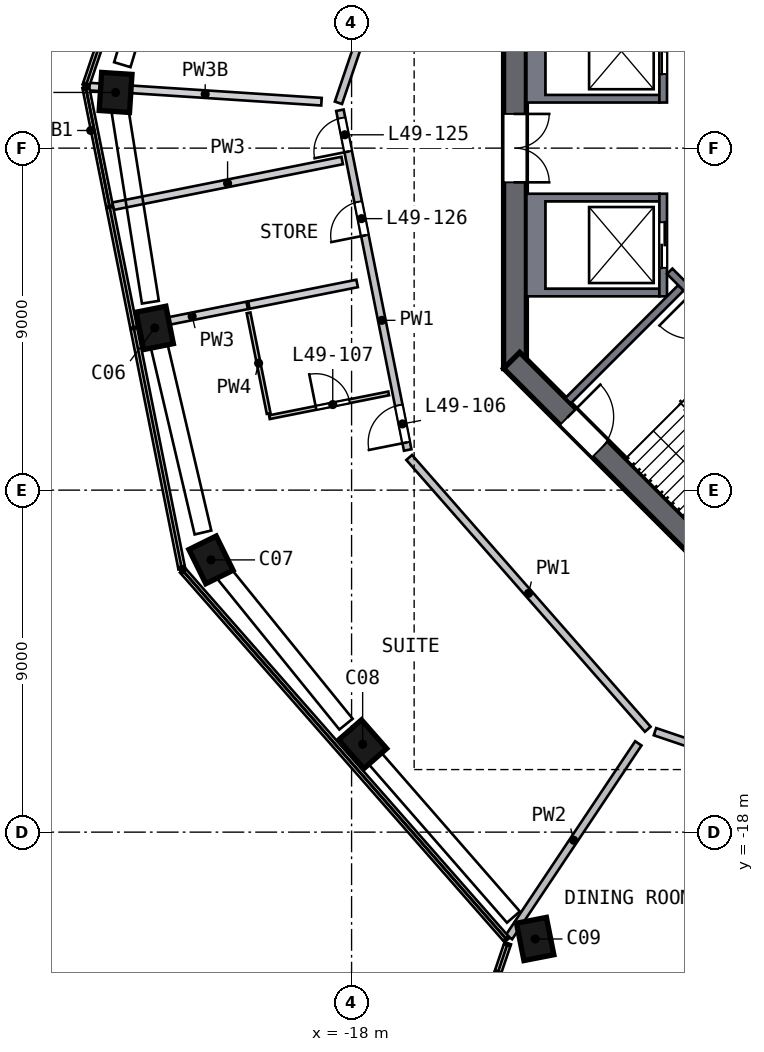
"""IFC4 building model, lengths in metres.
Left out: names, types, materials, properties, quantities, classifications, styles, units other than length and angle.
Written with IfcOpenShell. Run it as: python <this file> out.ifc"""

import sys

from ifc_helpers import new_model, si_unit, direction, frame, frame_2d, origin, origin_2d, place, context, subcontext, project, spatial, polyline, rectangle, outline, extrude, element, fill, save


model = new_model("IFC4")
c1 = context("Model", 3, precision=1e-05, world=origin(), true_north=direction((0.0, 1.0)))
c2 = subcontext(c1, "Body", "Model", "MODEL_VIEW")
j1 = project(units=[si_unit("LENGTHUNIT", "METRE"), si_unit("PLANEANGLEUNIT", "RADIAN")], contexts=[c1])
p1 = place(None, origin())
s1 = spatial("IfcSite", under=j1, at=p1, CompositionType="ELEMENT")
p2 = place(p1, origin())
s2 = spatial("IfcBuilding", under=s1, at=p2, CompositionType="ELEMENT")
p3 = place(p2, frame((0.0, 0.0, 201.0)))
s3 = spatial("IfcBuildingStorey", under=s2, at=p3, CompositionType="ELEMENT", Elevation=201.0)
p4 = place(p3, frame((-24.204, 1.574, 0.0), z_axis=(-0.005106808, -0.089833403, 0.995943713), x_axis=(0.064922521, 0.993825699, 0.089975257)))
e1 = element("IfcColumn", 1, at=p4, inside=s3, PredefinedType="COLUMN", context=c2, shape_type="SweptSolid", body=[
    extrude(rectangle(XDim=1.0, YDim=0.8, at=origin_2d()), origin(), (0.0, 0.0, 1.0), 4.207),
])
p5 = place(p3, frame((-23.201, -4.628, 0.0), z_axis=(0.017877406, -0.085904417, 0.996142976), x_axis=(0.194715676, -0.976927418, -0.087741814)))
e2 = element("IfcColumn", 2, at=p5, inside=s3, PredefinedType="COLUMN", context=c2, shape_type="SweptSolid", body=[
    extrude(rectangle(XDim=1.0, YDim=0.8, at=origin_2d()), origin(), (0.0, 0.0, 1.0), 4.206),
])
p6 = place(p3, frame((-21.748, -10.739, 0.0), z_axis=(0.040506371, -0.080316357, 0.995946041), x_axis=(-0.44095499, 0.893010518, 0.08994949)))
e3 = element("IfcColumn", 3, at=p6, inside=s3, PredefinedType="COLUMN", context=c2, shape_type="SweptSolid", body=[
    extrude(rectangle(XDim=1.0, YDim=0.8, at=origin_2d()), origin(), (0.0, 0.0, 1.0), 4.207),
])
p7 = place(p3, frame((-17.779, -15.608, 0.0), z_axis=(0.058449937, -0.065415172, 0.996144799), x_axis=(0.65742794, -0.748393953, -0.087721123)))
e4 = element("IfcColumn", 4, at=p7, inside=s3, PredefinedType="COLUMN", context=c2, shape_type="SweptSolid", body=[
    extrude(rectangle(XDim=1.0, YDim=0.8, at=origin_2d()), origin(), (0.0, 0.0, 1.0), 4.206),
])
p8 = place(p3, frame((-13.262, -20.753, 0.0), z_axis=(0.077347199, -0.048508821, 0.995823431), x_axis=(-0.191233181, 0.979548334, 0.062569411)))
e5 = element("IfcColumn", 5, at=p8, inside=s3, PredefinedType="COLUMN", context=c2, shape_type="SweptSolid", body=[
    extrude(rectangle(XDim=1.0, YDim=0.8, at=origin_2d()), origin(), (0.0, 0.0, 1.0), 4.208),
])
p9 = place(p3, frame((-13.7, 5.799, 0.0), z_axis=(0.0, 0.0, 1.0), x_axis=(0.0, -1.0, 0.0)))
e6 = element("IfcWall", 6, at=p9, inside=s3, PredefinedType="SHEAR", context=c2, shape_type="SweptSolid", body=[
    extrude(rectangle(XDim=11.598, YDim=0.6, at=frame_2d((5.799, 0.0))), origin(), (0.0, 0.0, 1.0), 4.5),
])
p10 = place(p9, frame((4.899, 0.0, 0.0)))
e7 = element("IfcOpeningElement", 7, at=p10, cuts=e6, PredefinedType="OPENING", context=c2, shape_type="SweptSolid", body=[
    extrude(rectangle(XDim=1.8, YDim=2.1, at=frame_2d((0.9, 1.05))), frame((0.0, 0.31, 0.0), z_axis=(0.0, -1.0, 0.0), x_axis=(1.0, 0.0, 0.0)), (0.0, 0.0, 1.0), 0.62),
])
p11 = place(p3, frame((-13.788, -5.587, 0.0), z_axis=(0.0, 0.0, 1.0), x_axis=(0.707106781, -0.707106781, 0.0)))
e8 = element("IfcWall", 8, at=p11, inside=s3, PredefinedType="SHEAR", context=c2, shape_type="SweptSolid", body=[
    extrude(rectangle(XDim=11.598, YDim=0.6, at=frame_2d((5.799, 0.0))), origin(), (0.0, 0.0, 1.0), 4.5),
])
p12 = place(p11, frame((2.099, 0.0, 0.0)))
e9 = element("IfcOpeningElement", 9, at=p12, cuts=e8, PredefinedType="OPENING", context=c2, shape_type="SweptSolid", body=[
    extrude(rectangle(XDim=1.2, YDim=2.1, at=frame_2d((0.6, 1.05))), frame((0.0, 0.31, 0.0), z_axis=(0.0, -1.0, 0.0), x_axis=(1.0, 0.0, 0.0)), (0.0, 0.0, 1.0), 0.62),
])
p13 = place(p3, origin())
e10 = element("IfcWall", 10, at=p13, inside=s3, PredefinedType="SOLIDWALL", context=c2, shape_type="SweptSolid", body=[
    extrude(outline(polyline([(-13.4, 3.9), (-9.9, 3.9), (-9.9, 3.7), (-12.9, 3.7), (-12.9, 1.4), (-9.9, 1.4), (-9.9, 1.2), (-13.4, 1.2), (-13.4, 3.9)])), origin(), (0.0, 0.0, 1.0), 4.19),
])
p14 = place(p3, frame((-9.8, 1.2, 0.0), z_axis=(0.0, 0.0, 1.0), x_axis=(0.0, 1.0, 0.0)))
e11 = element("IfcWall", 11, at=p14, inside=s3, PredefinedType="SOLIDWALL", context=c2, shape_type="SweptSolid", body=[
    extrude(rectangle(XDim=2.7, YDim=0.2, at=frame_2d((1.35, 0.0))), origin(), (0.0, 0.0, 1.0), 4.19),
])
p15 = place(p14, frame((0.75, 0.0, 0.0)))
e12 = element("IfcOpeningElement", 12, at=p15, cuts=e11, PredefinedType="OPENING", context=c2, shape_type="SweptSolid", body=[
    extrude(rectangle(XDim=1.2, YDim=2.1, at=frame_2d((0.6, 1.05))), frame((0.0, 0.11, 0.0), z_axis=(0.0, -1.0, 0.0), x_axis=(1.0, 0.0, 0.0)), (0.0, 0.0, 1.0), 0.22),
])
p16 = place(p3, origin())
e13 = element("IfcWall", 13, at=p16, inside=s3, PredefinedType="SOLIDWALL", context=c2, shape_type="SweptSolid", body=[
    extrude(outline(polyline([(-13.4, -3.9), (-13.4, -1.2), (-9.9, -1.2), (-9.9, -1.4), (-12.9, -1.4), (-12.9, -3.7), (-9.9, -3.7), (-9.9, -3.9), (-13.4, -3.9)])), origin(), (0.0, 0.0, 1.0), 4.19),
])
p17 = place(p3, frame((-9.8, -1.2, 0.0), z_axis=(0.0, 0.0, 1.0), x_axis=(0.0, -1.0, 0.0)))
e14 = element("IfcWall", 14, at=p17, inside=s3, PredefinedType="SOLIDWALL", context=c2, shape_type="SweptSolid", body=[
    extrude(rectangle(XDim=2.7, YDim=0.2, at=frame_2d((1.35, 0.0))), origin(), (0.0, 0.0, 1.0), 4.19),
])
p18 = place(p17, frame((0.75, 0.0, 0.0)))
e15 = element("IfcOpeningElement", 15, at=p18, cuts=e14, PredefinedType="OPENING", context=c2, shape_type="SweptSolid", body=[
    extrude(rectangle(XDim=1.2, YDim=2.1, at=frame_2d((0.6, 1.05))), frame((0.0, 0.11, 0.0), z_axis=(0.0, -1.0, 0.0), x_axis=(1.0, 0.0, 0.0)), (0.0, 0.0, 1.0), 0.22),
])
p19 = place(p3, frame((-3.535, -9.334, 0.0), z_axis=(0.0, 0.0, 1.0), x_axis=(-0.707120946, 0.707092617, 0.0)))
e16 = element("IfcWall", 16, at=p19, inside=s3, PredefinedType="SOLIDWALL", context=c2, shape_type="SweptSolid", body=[
    extrude(rectangle(XDim=8.618, YDim=0.2, at=frame_2d((4.309, 0.0))), origin(), (0.0, 0.0, 1.0), 4.19),
])
p20 = place(p19, frame((6.6, 0.0, 0.0)))
e17 = element("IfcOpeningElement", 17, at=p20, cuts=e16, PredefinedType="OPENING", context=c2, shape_type="SweptSolid", body=[
    extrude(rectangle(XDim=1.2, YDim=2.1, at=frame_2d((0.6, 1.05))), frame((0.0, 0.11, 0.0), z_axis=(0.0, -1.0, 0.0), x_axis=(1.0, 0.0, 0.0)), (0.0, 0.0, 1.0), 0.22),
])
p21 = place(p3, frame((-9.334, -3.677, 0.0), z_axis=(0.0, 0.0, 1.0), x_axis=(-0.707135845, -0.707077716, 0.0)))
e18 = element("IfcWall", 18, at=p21, inside=s3, PredefinedType="SOLIDWALL", context=c2, shape_type="SweptSolid", body=[
    extrude(rectangle(XDim=4.2, YDim=0.2, at=frame_2d((2.1, 0.0))), origin(), (0.0, 0.0, 1.0), 4.19),
])
p22 = place(p3, frame((-16.524, -7.943, 0.0), z_axis=(0.0, 0.0, 1.0), x_axis=(-0.195611383, 0.980681491, 0.0)))
e19 = element("IfcWall", 19, at=p22, inside=s3, PredefinedType="SOLIDWALL", context=c2, shape_type="SweptSolid", body=[
    extrude(rectangle(XDim=9.116, YDim=0.2, at=frame_2d((4.558, 0.0))), origin(), (0.0, 0.0, 1.0), 4.19),
])
p23 = place(p22, frame((0.2, 0.0, 0.0)))
e20 = element("IfcOpeningElement", 20, at=p23, cuts=e19, PredefinedType="OPENING", context=c2, shape_type="SweptSolid", body=[
    extrude(rectangle(XDim=1.0, YDim=2.1, at=frame_2d((0.5, 1.05))), frame((0.0, 0.11, 0.0), z_axis=(0.0, -1.0, 0.0), x_axis=(1.0, 0.0, 0.0)), (0.0, 0.0, 1.0), 0.22),
])
p24 = place(p22, frame((8.008, 0.0, 0.0)))
e21 = element("IfcOpeningElement", 21, at=p24, cuts=e19, PredefinedType="OPENING", context=c2, shape_type="SweptSolid", body=[
    extrude(rectangle(XDim=0.9, YDim=2.1, at=frame_2d((0.45, 1.05))), frame((0.0, 0.11, 0.0), z_axis=(0.0, -1.0, 0.0), x_axis=(1.0, 0.0, 0.0)), (0.0, 0.0, 1.0), 0.22),
])
p25 = place(p22, frame((5.758, 0.0, 0.0)))
e22 = element("IfcOpeningElement", 22, at=p25, cuts=e19, PredefinedType="OPENING", context=c2, shape_type="SweptSolid", body=[
    extrude(rectangle(XDim=0.9, YDim=2.1, at=frame_2d((0.45, 1.05))), frame((0.0, 0.11, 0.0), z_axis=(0.0, -1.0, 0.0), x_axis=(1.0, 0.0, 0.0)), (0.0, 0.0, 1.0), 0.22),
])
p26 = place(p3, frame((-18.346, 1.193, 0.0), z_axis=(0.0, 0.0, 1.0), x_axis=(0.320932913, 0.94710193, 0.0)))
e23 = element("IfcWall", 23, at=p26, inside=s3, PredefinedType="SOLIDWALL", context=c2, shape_type="SweptSolid", body=[
    extrude(rectangle(XDim=9.317, YDim=0.2, at=frame_2d((4.658, 0.0))), origin(), (0.0, 0.0, 1.0), 4.19),
])
p27 = place(p26, frame((5.15, 0.0, 0.0)))
e24 = element("IfcOpeningElement", 24, at=p27, cuts=e23, PredefinedType="OPENING", context=c2, shape_type="SweptSolid", body=[
    extrude(rectangle(XDim=1.0, YDim=2.1, at=frame_2d((0.5, 1.05))), frame((0.0, 0.11, 0.0), z_axis=(0.0, -1.0, 0.0), x_axis=(1.0, 0.0, 0.0)), (0.0, 0.0, 1.0), 0.22),
])
p28 = place(p3, frame((-16.484, -8.14, 0.0), z_axis=(0.0, 0.0, 1.0), x_axis=(0.659731564, -0.75150134, 0.0)))
e25 = element("IfcWall", 25, at=p28, inside=s3, PredefinedType="SOLIDWALL", context=c2, shape_type="SweptSolid", body=[
    extrude(rectangle(XDim=9.516, YDim=0.2, at=frame_2d((4.758, 0.0))), origin(), (0.0, 0.0, 1.0), 4.19),
])
p29 = place(p3, frame((-1.382, -18.282, 0.0), z_axis=(0.0, 0.0, 1.0), x_axis=(-0.947096925, 0.320947681, 0.0)))
e26 = element("IfcWall", 26, at=p29, inside=s3, PredefinedType="SOLIDWALL", context=c2, shape_type="SweptSolid", body=[
    extrude(rectangle(XDim=9.117, YDim=0.2, at=frame_2d((4.559, 0.0))), origin(), (0.0, 0.0, 1.0), 4.19),
])
p30 = place(p29, frame((3.665, 0.0, 0.0)))
e27 = element("IfcOpeningElement", 27, at=p30, cuts=e26, PredefinedType="OPENING", context=c2, shape_type="SweptSolid", body=[
    extrude(rectangle(XDim=1.8, YDim=2.1, at=frame_2d((0.9, 1.05))), frame((0.0, 0.11, 0.0), z_axis=(0.0, -1.0, 0.0), x_axis=(1.0, 0.0, 0.0)), (0.0, 0.0, 1.0), 0.22),
])
p31 = place(p3, frame((-13.858, -20.764, 0.0), z_axis=(0.0, 0.0, 1.0), x_axis=(0.555131954, 0.831762294, 0.0)))
e28 = element("IfcWall", 28, at=p31, inside=s3, PredefinedType="SOLIDWALL", context=c2, shape_type="SweptSolid", body=[
    extrude(rectangle(XDim=6.132, YDim=0.2, at=frame_2d((3.066, 0.0))), origin(), (0.0, 0.0, 1.0), 4.19),
])
p32 = place(p3, frame((-10.797, -26.653, 0.0), z_axis=(0.0, 0.0, 1.0), x_axis=(0.320945371, 0.947097708, 0.0)))
e29 = element("IfcWall", 29, at=p32, inside=s3, PredefinedType="SOLIDWALL", context=c2, shape_type="SweptSolid", body=[
    extrude(rectangle(XDim=10.75, YDim=0.2, at=frame_2d((5.375, 0.0))), origin(), (0.0, 0.0, 1.0), 3.69),
])
p33 = place(p32, frame((1.95, 0.0, 0.0)))
e30 = element("IfcOpeningElement", 30, at=p33, cuts=e29, PredefinedType="OPENING", context=c2, shape_type="SweptSolid", body=[
    extrude(rectangle(XDim=1.0, YDim=2.1, at=frame_2d((0.5, 1.05))), frame((0.0, 0.11, 0.0), z_axis=(0.0, -1.0, 0.0), x_axis=(1.0, 0.0, 0.0)), (0.0, 0.0, 1.0), 0.22),
])
p34 = place(p3, frame((-20.182, -6.983, 0.0), z_axis=(0.0, 0.0, 1.0), x_axis=(-0.195577067, 0.980688335, 0.0)))
e31 = element("IfcWall", 31, at=p34, inside=s3, PredefinedType="PARTITIONING", context=c2, shape_type="SweptSolid", body=[
    extrude(rectangle(XDim=2.7, YDim=0.1, at=frame_2d((1.35, 0.0))), origin(), (0.0, 0.0, 1.0), 4.19),
])
p35 = place(p3, frame((-20.163, -7.081, 0.0), z_axis=(0.0, 0.0, 1.0), x_axis=(0.980680318, 0.195617266, 0.0)))
e32 = element("IfcWall", 32, at=p35, inside=s3, PredefinedType="PARTITIONING", context=c2, shape_type="SweptSolid", body=[
    extrude(rectangle(XDim=3.2, YDim=0.1, at=frame_2d((1.6, 0.0))), origin(), (0.0, 0.0, 1.0), 4.19),
])
p36 = place(p35, frame((1.25, 0.0, 0.0)))
e33 = element("IfcOpeningElement", 33, at=p36, cuts=e32, PredefinedType="OPENING", context=c2, shape_type="SweptSolid", body=[
    extrude(rectangle(XDim=0.9, YDim=2.1, at=frame_2d((0.45, 1.05))), frame((0.0, 0.06, 0.0), z_axis=(0.0, -1.0, 0.0), x_axis=(1.0, 0.0, 0.0)), (0.0, 0.0, 1.0), 0.12),
])
p37 = place(p3, frame((-20.748, -4.138, 0.0), z_axis=(0.0, 0.0, 1.0), x_axis=(-0.980666471, -0.195686672, 0.0)))
e34 = element("IfcWall", 34, at=p37, inside=s3, PredefinedType="SOLIDWALL", context=c2, shape_type="SweptSolid", body=[
    extrude(rectangle(XDim=2.952, YDim=0.2, at=frame_2d((1.476, 0.0))), origin(), (0.0, 0.0, 1.0), 4.19),
])
p38 = place(p3, frame((-24.912, 1.62, 0.0), z_axis=(0.0, 0.0, 1.0), x_axis=(0.997892173, -0.064893846, 0.0)))
e35 = element("IfcWall", 35, at=p38, inside=s3, PredefinedType="SOLIDWALL", context=c2, shape_type="SweptSolid", body=[
    extrude(rectangle(XDim=6.132, YDim=0.2, at=frame_2d((3.066, 0.0))), origin(), (0.0, 0.0, 1.0), 3.69),
])
p39 = place(p3, frame((-18.247, -0.325, 0.0), z_axis=(0.0, 0.0, 1.0), x_axis=(-0.98067827, -0.195627531, 0.0)))
e36 = element("IfcWall", 36, at=p39, inside=s3, PredefinedType="SOLIDWALL", context=c2, shape_type="SweptSolid", body=[
    extrude(rectangle(XDim=6.15, YDim=0.2, at=frame_2d((3.075, 0.0))), origin(), (0.0, 0.0, 1.0), 4.19),
])
p40 = place(p3, frame((-17.854, -3.561, 0.0), z_axis=(0.0, 0.0, 1.0), x_axis=(-0.980667866, -0.195679677, 0.0)))
e37 = element("IfcWall", 37, at=p40, inside=s3, PredefinedType="SOLIDWALL", context=c2, shape_type="SweptSolid", body=[
    extrude(rectangle(XDim=2.905, YDim=0.2, at=frame_2d((1.452, 0.0))), origin(), (0.0, 0.0, 1.0), 4.19),
])
p41 = place(p15, origin())
e38 = element("IfcDoor", 38, at=p41, inside=s3, OperationType="DOUBLE_DOOR_SLIDING", PredefinedType="DOOR", context=c2, shape_type="SweptSolid", body=[
    extrude(rectangle(XDim=1.2, YDim=2.1, at=frame_2d((0.6, 1.05))), frame((0.0, 0.025, 0.0), z_axis=(0.0, -1.0, 0.0), x_axis=(1.0, 0.0, 0.0)), (0.0, 0.0, 1.0), 0.05),
])
fill(e12, e38)
p42 = place(p18, origin())
e39 = element("IfcDoor", 39, at=p42, inside=s3, OperationType="DOUBLE_DOOR_SLIDING", PredefinedType="DOOR", context=c2, shape_type="SweptSolid", body=[
    extrude(rectangle(XDim=1.2, YDim=2.1, at=frame_2d((0.6, 1.05))), frame((0.0, 0.025, 0.0), z_axis=(0.0, -1.0, 0.0), x_axis=(1.0, 0.0, 0.0)), (0.0, 0.0, 1.0), 0.05),
])
fill(e15, e39)
p43 = place(p10, origin())
e40 = element("IfcDoor", 40, at=p43, inside=s3, OperationType="DOUBLE_DOOR_SINGLE_SWING", PredefinedType="DOOR", context=c2, shape_type="SweptSolid", body=[
    extrude(rectangle(XDim=1.8, YDim=2.1, at=frame_2d((0.9, 1.05))), frame((0.0, 0.025, 0.0), z_axis=(0.0, -1.0, 0.0), x_axis=(1.0, 0.0, 0.0)), (0.0, 0.0, 1.0), 0.05),
])
fill(e7, e40)
p44 = place(p12, origin())
e41 = element("IfcDoor", 41, at=p44, inside=s3, OperationType="SINGLE_SWING_LEFT", PredefinedType="DOOR", context=c2, shape_type="SweptSolid", body=[
    extrude(rectangle(XDim=1.2, YDim=2.1, at=frame_2d((0.6, 1.05))), frame((0.0, 0.025, 0.0), z_axis=(0.0, -1.0, 0.0), x_axis=(1.0, 0.0, 0.0)), (0.0, 0.0, 1.0), 0.05),
])
fill(e9, e41)
p45 = place(p23, origin())
e42 = element("IfcDoor", 42, at=p45, inside=s3, OperationType="SINGLE_SWING_LEFT", PredefinedType="DOOR", context=c2, shape_type="SweptSolid", body=[
    extrude(rectangle(XDim=1.0, YDim=2.1, at=frame_2d((0.5, 1.05))), frame((0.0, 0.025, 0.0), z_axis=(0.0, -1.0, 0.0), x_axis=(1.0, 0.0, 0.0)), (0.0, 0.0, 1.0), 0.05),
])
fill(e20, e42)
p46 = place(p36, origin())
e43 = element("IfcDoor", 43, at=p46, inside=s3, OperationType="SINGLE_SWING_LEFT", PredefinedType="DOOR", context=c2, shape_type="SweptSolid", body=[
    extrude(rectangle(XDim=0.9, YDim=2.1, at=frame_2d((0.45, 1.05))), frame((0.0, 0.025, 0.0), z_axis=(0.0, -1.0, 0.0), x_axis=(1.0, 0.0, 0.0)), (0.0, 0.0, 1.0), 0.05),
])
fill(e33, e43)
p47 = place(p24, origin())
e44 = element("IfcDoor", 44, at=p47, inside=s3, OperationType="SINGLE_SWING_LEFT", PredefinedType="DOOR", context=c2, shape_type="SweptSolid", body=[
    extrude(rectangle(XDim=0.9, YDim=2.1, at=frame_2d((0.45, 1.05))), frame((0.0, 0.025, 0.0), z_axis=(0.0, -1.0, 0.0), x_axis=(1.0, 0.0, 0.0)), (0.0, 0.0, 1.0), 0.05),
])
fill(e21, e44)
p48 = place(p25, origin())
e45 = element("IfcDoor", 45, at=p48, inside=s3, OperationType="SINGLE_SWING_LEFT", PredefinedType="DOOR", context=c2, shape_type="SweptSolid", body=[
    extrude(rectangle(XDim=0.9, YDim=2.1, at=frame_2d((0.45, 1.05))), frame((0.0, 0.025, 0.0), z_axis=(0.0, -1.0, 0.0), x_axis=(1.0, 0.0, 0.0)), (0.0, 0.0, 1.0), 0.05),
])
fill(e22, e45)
save(model, sys.argv[1])
